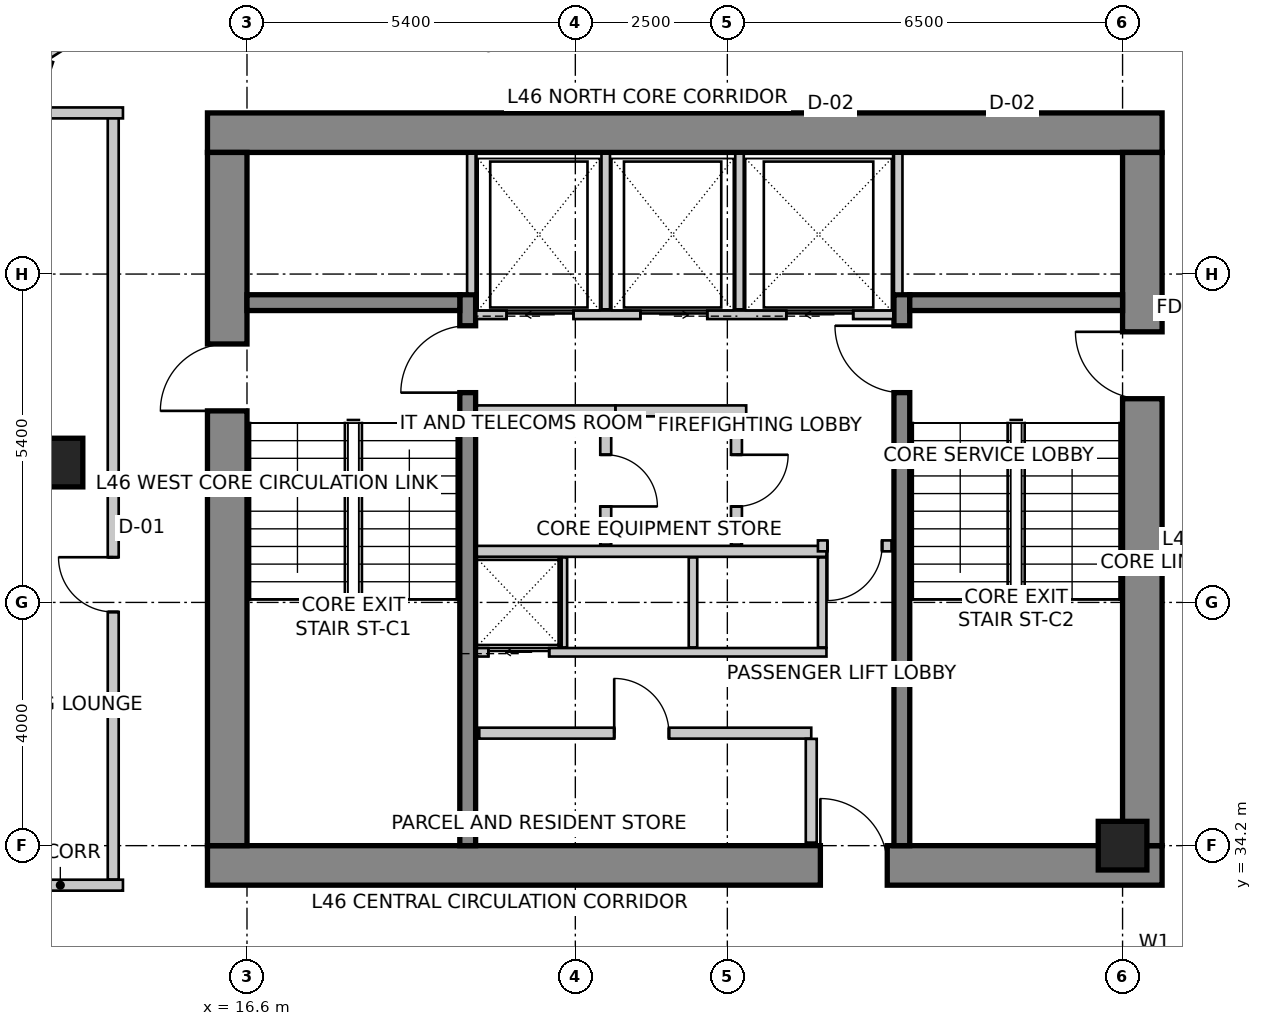
"""IFC4 building model, lengths in metres.
Left out: names, types, materials, properties, quantities, classifications, styles, units other than length and angle.
Written with IfcOpenShell. Run it as: python <this file> out.ifc"""

import sys

from ifc_helpers import new_model, si_unit, direction, frame, frame_2d, origin, origin_2d, place, context, subcontext, project, spatial, rectangle, extrude, source, transform, mapped, element, fill, save


model = new_model("IFC4")
c1 = context("Model", 3, precision=1e-05, world=origin(), true_north=direction((0.0, 1.0)))
c2 = subcontext(c1, "Body", "Model", "MODEL_VIEW")
j1 = project(units=[si_unit("LENGTHUNIT", "METRE"), si_unit("PLANEANGLEUNIT", "RADIAN")], contexts=[c1])
p1 = place(None, origin())
s1 = spatial("IfcSite", under=j1, at=p1, CompositionType="ELEMENT")
p2 = place(p1, origin())
s2 = spatial("IfcBuilding", under=s1, at=p2, CompositionType="ELEMENT")
p3 = place(p2, frame((0.0, 0.0, 186.9)))
s3 = spatial("IfcBuildingStorey", under=s2, at=p3, CompositionType="ELEMENT", Elevation=186.9)
p4 = place(p3, frame((15.95, 45.925, 0.0), z_axis=(0.0, 0.0, 1.0), x_axis=(1.0, 0.0, 0.0)))
e1 = element("IfcWall", 1, at=p4, inside=s3, PredefinedType="SHEAR", context=c2, shape_type="SweptSolid", body=[
    extrude(rectangle(XDim=15.7, YDim=0.65, at=frame_2d((7.85, 0.0))), origin(), (0.0, 0.0, 1.0), 3.5),
])
p5 = place(p3, frame((15.95, 33.875, 0.0), z_axis=(0.0, 0.0, 1.0), x_axis=(1.0, 0.0, 0.0)))
e2 = element("IfcWall", 2, at=p5, inside=s3, PredefinedType="SHEAR", context=c2, shape_type="SweptSolid", body=[
    extrude(rectangle(XDim=15.7, YDim=0.65, at=frame_2d((7.85, 0.0))), origin(), (0.0, 0.0, 1.0), 3.5),
])
m1 = source(origin(), c2, "Body", "SweptSolid", [
    extrude(rectangle(XDim=1.1, YDim=2.15, at=frame_2d((0.55, 1.075))), frame((0.0, 0.335, 0.0), z_axis=(0.0, -1.0, 0.0), x_axis=(1.0, 0.0, 0.0)), (0.0, 0.0, 1.0), 0.67),
])
p6 = place(p5, frame((10.08, 0.0, 0.0)))
e3 = element("IfcOpeningElement", 3, at=p6, cuts=e2, PredefinedType="OPENING", context=c2, shape_type="MappedRepresentation", body=[
    mapped(m1, transform((0.0, 0.0, 0.0), scale=1.0)),
])
p7 = place(p3, frame((16.275, 34.2, 0.0), z_axis=(0.0, 0.0, 1.0), x_axis=(0.0, 1.0, 0.0)))
e4 = element("IfcWall", 4, at=p7, inside=s3, PredefinedType="SHEAR", context=c2, shape_type="SweptSolid", body=[
    extrude(rectangle(XDim=11.4, YDim=0.65, at=frame_2d((5.7, 0.0))), origin(), (0.0, 0.0, 1.0), 3.5),
])
p8 = place(p7, frame((7.15, 0.0, 0.0)))
e5 = element("IfcOpeningElement", 5, at=p8, cuts=e4, PredefinedType="OPENING", context=c2, shape_type="MappedRepresentation", body=[
    mapped(m1, transform((0.0, 0.0, 0.0), scale=1.0)),
])
p9 = place(p3, frame((31.325, 34.2, 0.0), z_axis=(0.0, 0.0, 1.0), x_axis=(0.0, 1.0, 0.0)))
e6 = element("IfcWall", 6, at=p9, inside=s3, PredefinedType="SHEAR", context=c2, shape_type="SweptSolid", body=[
    extrude(rectangle(XDim=11.4, YDim=0.65, at=frame_2d((5.7, 0.0))), origin(), (0.0, 0.0, 1.0), 3.5),
])
p10 = place(p9, frame((7.35, 0.0, 0.0)))
e7 = element("IfcOpeningElement", 7, at=p10, cuts=e6, PredefinedType="OPENING", context=c2, shape_type="MappedRepresentation", body=[
    mapped(m1, transform((0.0, 0.0, 0.0), scale=1.0)),
])
p11 = place(p3, frame((20.23, 34.2, 0.0), z_axis=(0.0, 0.0, 1.0), x_axis=(0.0, 1.0, 0.0)))
e8 = element("IfcWall", 8, at=p11, inside=s3, PredefinedType="SHEAR", context=c2, shape_type="SweptSolid", body=[
    extrude(rectangle(XDim=9.06, YDim=0.26, at=frame_2d((4.53, 0.0))), origin(), (0.0, 0.0, 1.0), 3.5),
])
m2 = source(origin(), c2, "Body", "SweptSolid", [
    extrude(rectangle(XDim=1.1, YDim=2.15, at=frame_2d((0.55, 1.075))), frame((0.0, 0.14, 0.0), z_axis=(0.0, -1.0, 0.0), x_axis=(1.0, 0.0, 0.0)), (0.0, 0.0, 1.0), 0.28),
])
p12 = place(p11, frame((7.45, 0.0, 0.0)))
e9 = element("IfcOpeningElement", 9, at=p12, cuts=e8, PredefinedType="OPENING", context=c2, shape_type="MappedRepresentation", body=[
    mapped(m2, transform((0.0, 0.0, 0.0), scale=1.0)),
])
p13 = place(p3, frame((27.37, 34.2, 0.0), z_axis=(0.0, 0.0, 1.0), x_axis=(0.0, 1.0, 0.0)))
e10 = element("IfcWall", 10, at=p13, inside=s3, PredefinedType="SHEAR", context=c2, shape_type="SweptSolid", body=[
    extrude(rectangle(XDim=9.06, YDim=0.26, at=frame_2d((4.53, 0.0))), origin(), (0.0, 0.0, 1.0), 3.5),
])
p14 = place(p13, frame((7.45, 0.0, 0.0)))
e11 = element("IfcOpeningElement", 11, at=p14, cuts=e10, PredefinedType="OPENING", context=c2, shape_type="MappedRepresentation", body=[
    mapped(m2, transform((0.0, 0.0, 0.0), scale=1.0)),
])
for number, where, z_axis, x_axis in (
    (12, (16.6, 43.13, 0.0), (0.0, 0.0, 1.0), (1.0, 0.0, 0.0)),
    (13, (27.5, 43.13, 0.0), (0.0, 0.0, 1.0), (1.0, 0.0, 0.0)),
):
    element("IfcWall", number, at=place(p3, frame(where, z_axis=z_axis, x_axis=x_axis)), inside=s3, PredefinedType="SHEAR", context=c2, shape_type="SweptSolid", body=[
        extrude(rectangle(XDim=3.5, YDim=0.26, at=frame_2d((1.75, 0.0))), origin(), (0.0, 0.0, 1.0), 3.5),
    ])
m3 = source(origin(), c2, "Body", "SweptSolid", [
    extrude(rectangle(XDim=0.8, YDim=0.8, at=origin_2d()), origin(), (0.0, 0.0, 1.0), 3.5),
])
for number, where, z_axis, x_axis in (
    (14, (13.5, 40.5, 0.0), (0.0, 0.0, 1.0), (1.0, 0.0, 0.0)),
    (15, (31.0, 34.2, 0.0), (0.0, 0.0, 1.0), (1.0, 0.0, 0.0)),
):
    element("IfcColumn", number, at=place(p3, frame(where, z_axis=z_axis, x_axis=x_axis)), inside=s3, PredefinedType="COLUMN", context=c2, shape_type="MappedRepresentation", body=[
        mapped(m3, transform((0.0, 0.0, 0.0), scale=1.0)),
    ])
p15 = place(p3, frame((21.875, 52.742, 0.0), z_axis=(0.0, 0.0, 1.0), x_axis=(-0.843666375448, -0.536867811419, 0.0)))
e16 = element("IfcWall", 16, at=p15, inside=s3, PredefinedType="SOLIDWALL", context=c2, shape_type="SweptSolid", body=[
    extrude(rectangle(XDim=10.284, YDim=0.3, at=frame_2d((5.142, 0.0))), origin(), (0.0, 0.0, 1.0), 3.25),
])
m4 = source(origin(), c2, "Body", "SweptSolid", [
    extrude(rectangle(XDim=2.1, YDim=2.0, at=frame_2d((1.05, 1.0))), frame((0.0, 0.16, 0.0), z_axis=(0.0, -1.0, 0.0), x_axis=(1.0, 0.0, 0.0)), (0.0, 0.0, 1.0), 0.32),
])
p16 = place(p15, frame((3.457, 0.0, 0.85)))
e17 = element("IfcOpeningElement", 17, at=p16, cuts=e16, PredefinedType="OPENING", context=c2, shape_type="MappedRepresentation", body=[
    mapped(m4, transform((0.0, 0.0, 0.0), scale=1.0)),
])
p17 = place(p3, frame((13.269, 47.134, 0.0), z_axis=(0.0, 0.0, 1.0), x_axis=(-0.319920776449, -0.947444297464, 0.0)))
e18 = element("IfcWall", 18, at=p17, inside=s3, PredefinedType="SOLIDWALL", context=c2, shape_type="SweptSolid", body=[
    extrude(rectangle(XDim=16.133, YDim=0.3, at=frame_2d((8.067, 0.0))), origin(), (0.0, 0.0, 1.0), 3.25),
])
m5 = source(origin(), c2, "Body", "SweptSolid", [
    extrude(rectangle(XDim=2.4, YDim=2.2, at=frame_2d((1.2, 1.1))), frame((0.0, 0.16, 0.0), z_axis=(0.0, -1.0, 0.0), x_axis=(1.0, 0.0, 0.0)), (0.0, 0.0, 1.0), 0.32),
])
p18 = place(p17, frame((2.363, 0.0, 0.85)))
e19 = element("IfcOpeningElement", 19, at=p18, cuts=e18, PredefinedType="OPENING", context=c2, shape_type="MappedRepresentation", body=[
    mapped(m5, transform((0.0, 0.0, 0.0), scale=1.0)),
])
p19 = place(p17, frame((7.41, 0.0, 0.85)))
e20 = element("IfcOpeningElement", 20, at=p19, cuts=e18, PredefinedType="OPENING", context=c2, shape_type="MappedRepresentation", body=[
    mapped(m4, transform((0.0, 0.0, 0.0), scale=1.0)),
])
p20 = place(p17, frame((12.157, 0.0, 0.85)))
e21 = element("IfcOpeningElement", 21, at=p20, cuts=e18, PredefinedType="OPENING", context=c2, shape_type="MappedRepresentation", body=[
    mapped(m5, transform((0.0, 0.0, 0.0), scale=1.0)),
])
p21 = place(p3, frame((20.37, 42.93, 0.0), z_axis=(0.0, 0.0, 1.0), x_axis=(1.0, 0.0, 0.0)))
e22 = element("IfcWall", 22, at=p21, inside=s3, PredefinedType="SOLIDWALL", context=c2, shape_type="SweptSolid", body=[
    extrude(rectangle(XDim=6.86, YDim=0.14, at=frame_2d((3.43, 0.0))), origin(), (0.0, 0.0, 1.0), 3.25),
])
m6 = source(origin(), c2, "Body", "SweptSolid", [
    extrude(rectangle(XDim=1.1, YDim=2.15, at=frame_2d((0.55, 1.075))), frame((0.0, 0.08, 0.0), z_axis=(0.0, -1.0, 0.0), x_axis=(1.0, 0.0, 0.0)), (0.0, 0.0, 1.0), 0.16),
])
p22 = place(p21, frame((0.5, 0.0, 0.0)))
e23 = element("IfcOpeningElement", 23, at=p22, cuts=e22, PredefinedType="OPENING", context=c2, shape_type="MappedRepresentation", body=[
    mapped(m6, transform((0.0, 0.0, 0.0), scale=1.0)),
])
p23 = place(p21, frame((2.7, 0.0, 0.0)))
e24 = element("IfcOpeningElement", 24, at=p23, cuts=e22, PredefinedType="OPENING", context=c2, shape_type="MappedRepresentation", body=[
    mapped(m6, transform((0.0, 0.0, 0.0), scale=1.0)),
])
p24 = place(p21, frame((5.1, 0.0, 0.0)))
e25 = element("IfcOpeningElement", 25, at=p24, cuts=e22, PredefinedType="OPENING", context=c2, shape_type="MappedRepresentation", body=[
    mapped(m6, transform((0.0, 0.0, 0.0), scale=1.0)),
])
for number, where, z_axis, x_axis in (
    (26, (20.29, 43.28, 0.0), (0.0, 0.0, 1.0), (0.0, 1.0, 0.0)),
    (27, (27.31, 43.28, 0.0), (0.0, 0.0, 1.0), (0.0, 1.0, 0.0)),
):
    element("IfcWall", number, at=place(p3, frame(where, z_axis=z_axis, x_axis=x_axis)), inside=s3, PredefinedType="SOLIDWALL", context=c2, shape_type="SweptSolid", body=[
        extrude(rectangle(XDim=2.3, YDim=0.14, at=frame_2d((1.15, 0.0))), origin(), (0.0, 0.0, 1.0), 3.25),
    ])
for number, where, z_axis, x_axis in (
    (28, (22.5, 43.02, 0.0), (0.0, 0.0, 1.0), (0.0, 1.0, 0.0)),
    (29, (24.7, 43.02, 0.0), (0.0, 0.0, 1.0), (0.0, 1.0, 0.0)),
):
    element("IfcWall", number, at=place(p3, frame(where, z_axis=z_axis, x_axis=x_axis)), inside=s3, PredefinedType="SOLIDWALL", context=c2, shape_type="SweptSolid", body=[
        extrude(rectangle(XDim=2.56, YDim=0.14, at=frame_2d((1.28, 0.0))), origin(), (0.0, 0.0, 1.0), 3.25),
    ])
p25 = place(p3, frame((20.38, 37.38, 0.0), z_axis=(0.0, 0.0, 1.0), x_axis=(1.0, 0.0, 0.0)))
e30 = element("IfcWall", 30, at=p25, inside=s3, PredefinedType="SOLIDWALL", context=c2, shape_type="SweptSolid", body=[
    extrude(rectangle(XDim=5.75, YDim=0.14, at=frame_2d((2.875, 0.0))), origin(), (0.0, 0.0, 1.0), 3.25),
])
m7 = source(origin(), c2, "Body", "SweptSolid", [
    extrude(rectangle(XDim=1.0, YDim=2.15, at=frame_2d((0.5, 1.075))), frame((0.0, 0.08, 0.0), z_axis=(0.0, -1.0, 0.0), x_axis=(1.0, 0.0, 0.0)), (0.0, 0.0, 1.0), 0.16),
])
p26 = place(p25, frame((0.19, 0.0, 0.0)))
e31 = element("IfcOpeningElement", 31, at=p26, cuts=e30, PredefinedType="OPENING", context=c2, shape_type="MappedRepresentation", body=[
    mapped(m7, transform((0.0, 0.0, 0.0), scale=1.0)),
])
p27 = place(p3, frame((20.38, 39.04, 0.0), z_axis=(0.0, 0.0, 1.0), x_axis=(1.0, 0.0, 0.0)))
e32 = element("IfcWall", 32, at=p27, inside=s3, PredefinedType="SOLIDWALL", context=c2, shape_type="SweptSolid", body=[
    extrude(rectangle(XDim=5.75, YDim=0.18, at=frame_2d((2.875, 0.0))), origin(), (0.0, 0.0, 1.0), 3.25),
])
for number, where, z_axis, x_axis in (
    (33, (26.06, 37.46, 0.0), (0.0, 0.0, 1.0), (0.0, 1.0, 0.0)),
    (34, (21.795, 37.46, 0.0), (0.0, 0.0, 1.0), (0.0, 1.0, 0.0)),
    (35, (23.935, 37.46, 0.0), (0.0, 0.0, 1.0), (0.0, 1.0, 0.0)),
):
    element("IfcWall", number, at=place(p3, frame(where, z_axis=z_axis, x_axis=x_axis)), inside=s3, PredefinedType="SOLIDWALL", context=c2, shape_type="SweptSolid", body=[
        extrude(rectangle(XDim=1.48, YDim=0.14, at=frame_2d((0.74, 0.0))), origin(), (0.0, 0.0, 1.0), 3.25),
    ])
p28 = place(p3, frame((22.66, 41.35, 0.0), z_axis=(0.0, 0.0, 1.0), x_axis=(-1.0, 0.0, 0.0)))
e36 = element("IfcWall", 36, at=p28, inside=s3, PredefinedType="PARTITIONING", context=c2, shape_type="SweptSolid", body=[
    extrude(rectangle(XDim=2.28, YDim=0.18, at=frame_2d((1.14, 0.0))), origin(), (0.0, 0.0, 1.0), 3.25),
])
p29 = place(p3, frame((24.81, 41.35, 0.0), z_axis=(0.0, 0.0, 1.0), x_axis=(-1.0, 0.0, 0.0)))
e37 = element("IfcWall", 37, at=p29, inside=s3, PredefinedType="PARTITIONING", context=c2, shape_type="SweptSolid", body=[
    extrude(rectangle(XDim=2.148, YDim=0.18, at=frame_2d((1.074, 0.0))), origin(), (0.0, 0.0, 1.0), 3.25),
])
p30 = place(p3, frame((22.5, 41.256, 0.0), z_axis=(0.0, 0.0, 1.0), x_axis=(0.0, -1.0, 0.0)))
e38 = element("IfcWall", 38, at=p30, inside=s3, PredefinedType="PARTITIONING", context=c2, shape_type="SweptSolid", body=[
    extrude(rectangle(XDim=2.106, YDim=0.18, at=frame_2d((1.053, 0.0))), origin(), (0.0, 0.0, 1.0), 3.25),
])
m8 = source(origin(), c2, "Body", "SweptSolid", [
    extrude(rectangle(XDim=0.85, YDim=2.15, at=frame_2d((0.425, 1.075))), frame((0.0, 0.1, 0.0), z_axis=(0.0, -1.0, 0.0), x_axis=(1.0, 0.0, 0.0)), (0.0, 0.0, 1.0), 0.2),
])
p31 = place(p30, frame((0.628, 0.0, 0.0)))
e39 = element("IfcOpeningElement", 39, at=p31, cuts=e38, PredefinedType="OPENING", context=c2, shape_type="MappedRepresentation", body=[
    mapped(m8, transform((0.0, 0.0, 0.0), scale=1.0)),
])
p32 = place(p3, frame((24.65, 41.256, 0.0), z_axis=(0.0, 0.0, 1.0), x_axis=(0.0, -1.0, 0.0)))
e40 = element("IfcWall", 40, at=p32, inside=s3, PredefinedType="PARTITIONING", context=c2, shape_type="SweptSolid", body=[
    extrude(rectangle(XDim=2.106, YDim=0.18, at=frame_2d((1.053, 0.0))), origin(), (0.0, 0.0, 1.0), 3.25),
])
p33 = place(p32, frame((0.628, 0.0, 0.0)))
e41 = element("IfcOpeningElement", 41, at=p33, cuts=e40, PredefinedType="OPENING", context=c2, shape_type="MappedRepresentation", body=[
    mapped(m8, transform((0.0, 0.0, 0.0), scale=1.0)),
])
p34 = place(p3, frame((27.2, 39.13, 0.0), z_axis=(0.0, 0.0, 1.0), x_axis=(-1.0, 0.0, 0.0)))
e42 = element("IfcWall", 42, at=p34, inside=s3, PredefinedType="PARTITIONING", context=c2, shape_type="SweptSolid", body=[
    extrude(rectangle(XDim=1.21, YDim=0.18, at=frame_2d((0.605, 0.0))), origin(), (0.0, 0.0, 1.0), 3.25),
])
m9 = source(origin(), c2, "Body", "SweptSolid", [
    extrude(rectangle(XDim=0.9, YDim=2.15, at=frame_2d((0.45, 1.075))), frame((0.0, 0.1, 0.0), z_axis=(0.0, -1.0, 0.0), x_axis=(1.0, 0.0, 0.0)), (0.0, 0.0, 1.0), 0.2),
])
p35 = place(p34, frame((0.155, 0.0, 0.0)))
e43 = element("IfcOpeningElement", 43, at=p35, cuts=e42, PredefinedType="OPENING", context=c2, shape_type="MappedRepresentation", body=[
    mapped(m9, transform((0.0, 0.0, 0.0), scale=1.0)),
])
p36 = place(p3, frame((20.42, 36.05, 0.0), z_axis=(0.0, 0.0, 1.0), x_axis=(1.0, 0.0, 0.0)))
e44 = element("IfcWall", 44, at=p36, inside=s3, PredefinedType="PARTITIONING", context=c2, shape_type="SweptSolid", body=[
    extrude(rectangle(XDim=5.46, YDim=0.18, at=frame_2d((2.73, 0.0))), origin(), (0.0, 0.0, 1.0), 3.25),
])
p37 = place(p36, frame((2.219, 0.0, 0.0)))
e45 = element("IfcOpeningElement", 45, at=p37, cuts=e44, PredefinedType="OPENING", context=c2, shape_type="MappedRepresentation", body=[
    mapped(m9, transform((0.0, 0.0, 0.0), scale=1.0)),
])
p38 = place(p3, frame((25.88, 35.956, 0.0), z_axis=(0.0, 0.0, 1.0), x_axis=(0.0, -1.0, 0.0)))
e46 = element("IfcWall", 46, at=p38, inside=s3, PredefinedType="PARTITIONING", context=c2, shape_type="SweptSolid", body=[
    extrude(rectangle(XDim=1.706, YDim=0.18, at=frame_2d((0.853, 0.0))), origin(), (0.0, 0.0, 1.0), 2.542),
])
p39 = place(p3, frame((12.5, 33.55, 0.0), z_axis=(0.0, 0.0, 1.0), x_axis=(1.0, 0.0, 0.0)))
e47 = element("IfcWall", 47, at=p39, inside=s3, PredefinedType="PARTITIONING", context=c2, shape_type="SweptSolid", body=[
    extrude(rectangle(XDim=2.06, YDim=0.18, at=frame_2d((1.03, 0.0))), origin(), (0.0, 0.0, 1.0), 3.25),
])
p40 = place(p3, frame((14.4, 33.644, 0.0), z_axis=(0.0, 0.0, 1.0), x_axis=(0.0, 1.0, 0.0)))
e48 = element("IfcWall", 48, at=p40, inside=s3, PredefinedType="PARTITIONING", context=c2, shape_type="SweptSolid", body=[
    extrude(rectangle(XDim=12.606, YDim=0.18, at=frame_2d((6.303, 0.0))), origin(), (0.0, 0.0, 1.0), 3.25),
])
p41 = place(p40, frame((4.399, 0.0, 0.0)))
e49 = element("IfcOpeningElement", 49, at=p41, cuts=e48, PredefinedType="OPENING", context=c2, shape_type="MappedRepresentation", body=[
    mapped(m9, transform((0.0, 0.0, 0.0), scale=1.0)),
])
p42 = place(p3, frame((14.56, 46.25, 0.0), z_axis=(0.0, 0.0, 1.0), x_axis=(-1.0, 0.0, 0.0)))
e50 = element("IfcWall", 50, at=p42, inside=s3, PredefinedType="PARTITIONING", context=c2, shape_type="SweptSolid", body=[
    extrude(rectangle(XDim=1.469, YDim=0.18, at=frame_2d((0.734, 0.0))), origin(), (0.0, 0.0, 1.0), 3.25),
])
m10 = source(origin(), c2, "Body", "SweptSolid", [
    extrude(rectangle(XDim=1.1, YDim=2.15, at=frame_2d((0.55, 1.075))), frame((0.0, 0.025, 0.0), z_axis=(0.0, -1.0, 0.0), x_axis=(1.0, 0.0, 0.0)), (0.0, 0.0, 1.0), 0.05),
])
p43 = place(p22, origin())
e51 = element("IfcDoor", 51, at=p43, inside=s3, OperationType="SLIDING_TO_LEFT", PredefinedType="DOOR", context=c2, shape_type="MappedRepresentation", body=[
    mapped(m10, transform((0.0, 0.0, 0.0), scale=1.0)),
])
fill(e23, e51)
p44 = place(p23, origin())
e52 = element("IfcDoor", 52, at=p44, inside=s3, OperationType="SLIDING_TO_RIGHT", PredefinedType="DOOR", context=c2, shape_type="MappedRepresentation", body=[
    mapped(m10, transform((0.0, 0.0, 0.0), scale=1.0)),
])
fill(e24, e52)
m11 = source(origin(), c2, "Body", "SweptSolid", [
    extrude(rectangle(XDim=1.1, YDim=2.15, at=frame_2d((0.55, 1.075))), frame((0.0, 0.025, 0.0), z_axis=(0.0, -1.0, 0.0), x_axis=(1.0, 0.0, 0.0)), (0.0, 0.0, 1.0), 0.05),
])
p45 = place(p24, origin())
e53 = element("IfcDoor", 53, at=p45, inside=s3, OperationType="SLIDING_TO_LEFT", PredefinedType="DOOR", context=c2, shape_type="MappedRepresentation", body=[
    mapped(m11, transform((0.0, 0.0, 0.0), scale=1.0)),
])
fill(e25, e53)
m12 = source(origin(), c2, "Body", "SweptSolid", [
    extrude(rectangle(XDim=1.0, YDim=2.15, at=frame_2d((0.5, 1.075))), frame((0.0, 0.025, 0.0), z_axis=(0.0, -1.0, 0.0), x_axis=(1.0, 0.0, 0.0)), (0.0, 0.0, 1.0), 0.05),
])
p46 = place(p26, origin())
e54 = element("IfcDoor", 54, at=p46, inside=s3, OperationType="SLIDING_TO_LEFT", PredefinedType="DOOR", context=c2, shape_type="MappedRepresentation", body=[
    mapped(m12, transform((0.0, 0.0, 0.0), scale=1.0)),
])
fill(e31, e54)
m13 = source(origin(), c2, "Body", "SweptSolid", [
    extrude(rectangle(XDim=1.1, YDim=2.15, at=frame_2d((0.55, 1.075))), frame((0.0, 0.025, 0.0), z_axis=(0.0, -1.0, 0.0), x_axis=(1.0, 0.0, 0.0)), (0.0, 0.0, 1.0), 0.05),
])
p47 = place(p12, origin())
e55 = element("IfcDoor", 55, at=p47, inside=s3, OperationType="SINGLE_SWING_LEFT", PredefinedType="DOOR", context=c2, shape_type="MappedRepresentation", body=[
    mapped(m13, transform((0.0, 0.0, 0.0), scale=1.0)),
])
fill(e9, e55)
p48 = place(p14, origin())
e56 = element("IfcDoor", 56, at=p48, inside=s3, OperationType="SINGLE_SWING_RIGHT", PredefinedType="DOOR", context=c2, shape_type="MappedRepresentation", body=[
    mapped(m13, transform((0.0, 0.0, 0.0), scale=1.0)),
])
fill(e11, e56)
p49 = place(p8, origin())
e57 = element("IfcDoor", 57, at=p49, inside=s3, OperationType="SINGLE_SWING_LEFT", PredefinedType="DOOR", context=c2, shape_type="MappedRepresentation", body=[
    mapped(m13, transform((0.0, 0.0, 0.0), scale=1.0)),
])
fill(e5, e57)
p50 = place(p10, origin())
e58 = element("IfcDoor", 58, at=p50, inside=s3, OperationType="SINGLE_SWING_RIGHT", PredefinedType="DOOR", context=c2, shape_type="MappedRepresentation", body=[
    mapped(m13, transform((0.0, 0.0, 0.0), scale=1.0)),
])
fill(e7, e58)
p51 = place(p6, origin())
e59 = element("IfcDoor", 59, at=p51, inside=s3, OperationType="SINGLE_SWING_LEFT", PredefinedType="DOOR", context=c2, shape_type="MappedRepresentation", body=[
    mapped(m13, transform((0.0, 0.0, 0.0), scale=1.0)),
])
fill(e3, e59)
m14 = source(origin(), c2, "Body", "SweptSolid", [
    extrude(rectangle(XDim=0.85, YDim=2.15, at=frame_2d((0.425, 1.075))), frame((0.0, 0.025, 0.0), z_axis=(0.0, -1.0, 0.0), x_axis=(1.0, 0.0, 0.0)), (0.0, 0.0, 1.0), 0.05),
])
p52 = place(p31, origin())
e60 = element("IfcDoor", 60, at=p52, inside=s3, OperationType="SINGLE_SWING_RIGHT", PredefinedType="DOOR", context=c2, shape_type="MappedRepresentation", body=[
    mapped(m14, transform((0.0, 0.0, 0.0), scale=1.0)),
])
fill(e39, e60)
p53 = place(p33, origin())
e61 = element("IfcDoor", 61, at=p53, inside=s3, OperationType="SINGLE_SWING_LEFT", PredefinedType="DOOR", context=c2, shape_type="MappedRepresentation", body=[
    mapped(m14, transform((0.0, 0.0, 0.0), scale=1.0)),
])
fill(e41, e61)
m15 = source(origin(), c2, "Body", "SweptSolid", [
    extrude(rectangle(XDim=0.9, YDim=2.15, at=frame_2d((0.45, 1.075))), frame((0.0, 0.025, 0.0), z_axis=(0.0, -1.0, 0.0), x_axis=(1.0, 0.0, 0.0)), (0.0, 0.0, 1.0), 0.05),
])
p54 = place(p35, origin())
e62 = element("IfcDoor", 62, at=p54, inside=s3, OperationType="SINGLE_SWING_RIGHT", PredefinedType="DOOR", context=c2, shape_type="MappedRepresentation", body=[
    mapped(m15, transform((0.0, 0.0, 0.0), scale=1.0)),
])
fill(e43, e62)
p55 = place(p37, origin())
e63 = element("IfcDoor", 63, at=p55, inside=s3, OperationType="SINGLE_SWING_LEFT", PredefinedType="DOOR", context=c2, shape_type="MappedRepresentation", body=[
    mapped(m15, transform((0.0, 0.0, 0.0), scale=1.0)),
])
fill(e45, e63)
m16 = source(origin(), c2, "Body", "SweptSolid", [
    extrude(rectangle(XDim=0.9, YDim=2.15, at=frame_2d((0.45, 1.075))), frame((0.0, 0.025, 0.0), z_axis=(0.0, -1.0, 0.0), x_axis=(1.0, 0.0, 0.0)), (0.0, 0.0, 1.0), 0.05),
])
p56 = place(p41, origin())
e64 = element("IfcDoor", 64, at=p56, inside=s3, OperationType="SINGLE_SWING_RIGHT", PredefinedType="DOOR", context=c2, shape_type="MappedRepresentation", body=[
    mapped(m16, transform((0.0, 0.0, 0.0), scale=1.0)),
])
fill(e49, e64)
save(model, sys.argv[1])
